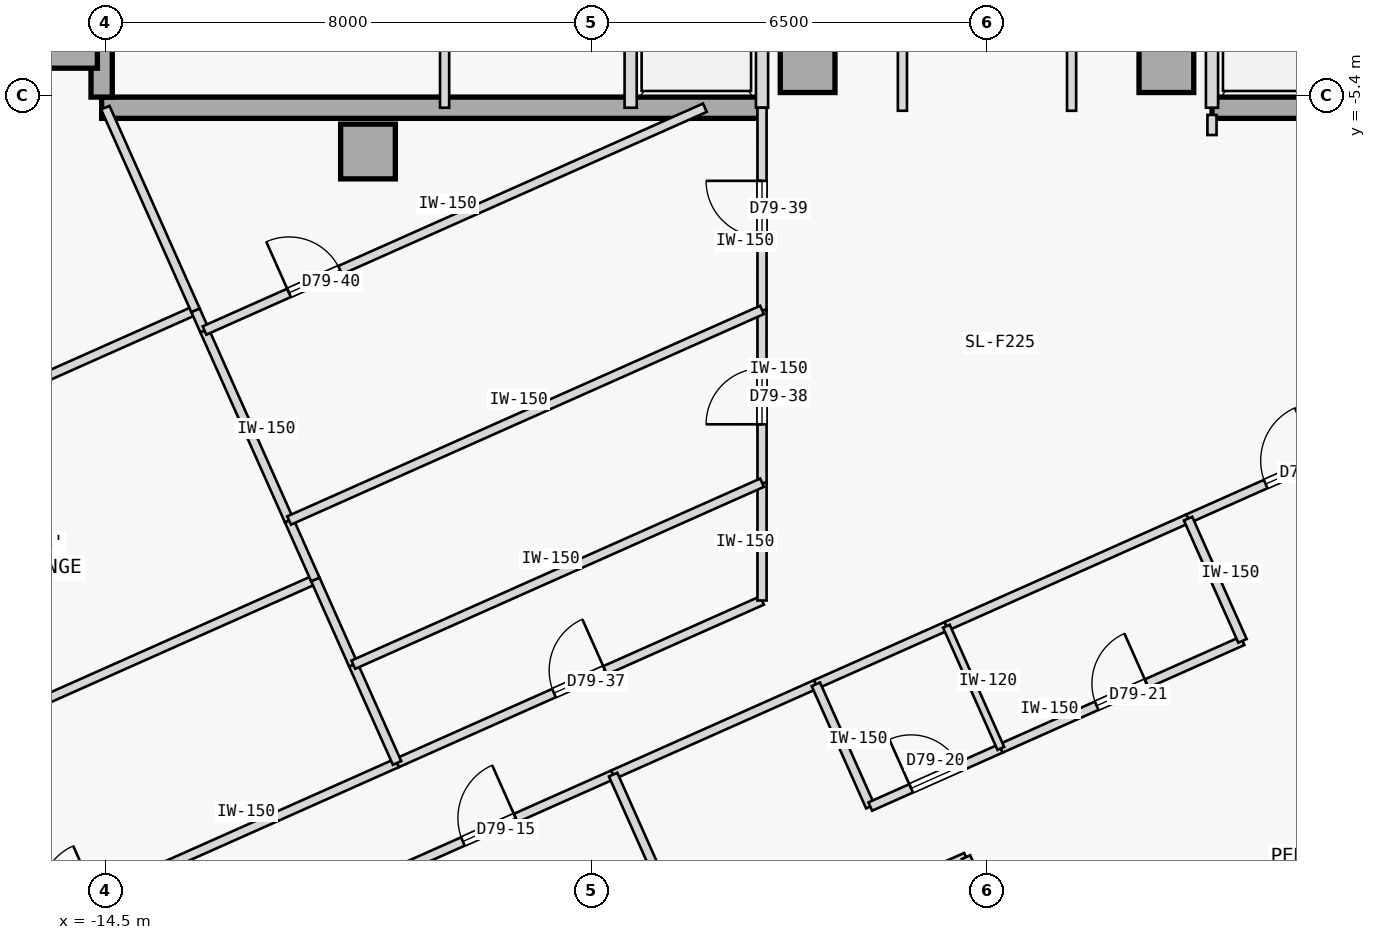
"""IFC4 building model, lengths in metres.
Left out: names, types, materials, properties, quantities, classifications, styles, units other than length and angle.
Written with IfcOpenShell. Run it as: python <this file> out.ifc"""

import sys

from ifc_helpers import new_model, si_unit, direction, frame, frame_2d, origin, origin_2d, place, context, subcontext, project, spatial, rectangle, extrude, element, fill, save


model = new_model("IFC4")
c1 = context("Model", 3, precision=1e-05, world=origin(), true_north=direction((0.0, 1.0)))
c2 = subcontext(c1, "Body", "Model", "MODEL_VIEW")
j1 = project(units=[si_unit("LENGTHUNIT", "METRE"), si_unit("PLANEANGLEUNIT", "RADIAN")], contexts=[c1])
p1 = place(None, origin())
s1 = spatial("IfcSite", under=j1, at=p1, CompositionType="ELEMENT")
p2 = place(p1, origin())
s2 = spatial("IfcBuilding", under=s1, at=p2, CompositionType="ELEMENT")
p3 = place(p2, frame((0.0, 0.0, 295.3)))
s3 = spatial("IfcBuildingStorey", under=s2, at=p3, CompositionType="ELEMENT", Elevation=295.3)
for number, where, z_axis, x_axis in (
    (1, (-15.08, -4.5, 0.0), (0.0, 0.0, 1.0), (1.0, 0.0, 0.0)),
    (2, (-10.18, -6.32, 0.0), (0.0, 0.0, 1.0), (1.0, 0.0, 0.0)),
    (3, (-2.95, -4.9, 0.0), (0.0, 0.0, 1.0), (1.0, 0.0, 0.0)),
    (4, (2.95, -4.9, 0.0), (0.0, 0.0, 1.0), (1.0, 0.0, 0.0)),
):
    element("IfcColumn", number, at=place(p3, frame(where, z_axis=z_axis, x_axis=x_axis)), inside=s3, PredefinedType="COLUMN", context=c2, shape_type="SweptSolid", body=[
        extrude(rectangle(XDim=0.9, YDim=0.9, at=origin_2d()), origin(), (0.0, 0.0, 1.0), 3.35),
    ])
p4 = place(p3, frame((-14.56, -5.6, 0.0), z_axis=(0.0, 0.0, 1.0), x_axis=(1.0, 0.0, 0.0)))
e5 = element("IfcWall", 5, at=p4, inside=s3, PredefinedType="SHEAR", context=c2, shape_type="SweptSolid", body=[
    extrude(rectangle(XDim=10.86, YDim=0.35, at=frame_2d((5.43, 0.0))), origin(), (0.0, 0.0, 1.0), 3.125),
])
p5 = place(p3, frame((-14.56, -5.425, 0.0), z_axis=(0.0, 0.0, 1.0), x_axis=(0.0, 1.0, 0.0)))
e6 = element("IfcWall", 6, at=p5, inside=s3, PredefinedType="SHEAR", context=c2, shape_type="SweptSolid", body=[
    extrude(rectangle(XDim=10.85, YDim=0.35, at=frame_2d((5.425, 0.0))), origin(), (0.0, 0.0, 1.0), 3.125),
])
p6 = place(p3, frame((3.7, -5.6, 0.0), z_axis=(0.0, 0.0, 1.0), x_axis=(1.0, 0.0, 0.0)))
e7 = element("IfcWall", 7, at=p6, inside=s3, PredefinedType="SHEAR", context=c2, shape_type="SweptSolid", body=[
    extrude(rectangle(XDim=10.86, YDim=0.35, at=frame_2d((5.43, 0.0))), origin(), (0.0, 0.0, 1.0), 3.125),
])
for number, where, z_axis, x_axis in (
    (8, (-3.7, -5.6, 0.0), (0.0, 0.0, 1.0), (0.0, 1.0, 0.0)),
    (9, (-5.86, -5.6, 0.0), (0.0, 0.0, 1.0), (0.0, 1.0, 0.0)),
    (10, (3.7, -5.6, 0.0), (0.0, 0.0, 1.0), (0.0, 1.0, 0.0)),
):
    element("IfcWall", number, at=place(p3, frame(where, z_axis=z_axis, x_axis=x_axis)), inside=s3, PredefinedType="STANDARD", context=c2, shape_type="SweptSolid", body=[
        extrude(rectangle(XDim=2.65, YDim=0.2, at=frame_2d((1.325, 0.0))), origin(), (0.0, 0.0, 1.0), 3.125),
    ])
p7 = place(p3, frame((-8.92, -5.6, 0.0), z_axis=(0.0, 0.0, 1.0), x_axis=(0.0, 1.0, 0.0)))
e11 = element("IfcWall", 11, at=p7, inside=s3, PredefinedType="PARTITIONING", context=c2, shape_type="SweptSolid", body=[
    extrude(rectangle(XDim=2.65, YDim=0.15, at=frame_2d((1.325, 0.0))), origin(), (0.0, 0.0, 1.0), 3.125),
])
p8 = place(p3, frame((-1.391, -5.65, 0.0), z_axis=(0.0, 0.0, 1.0), x_axis=(-2.1605738e-05, 0.999999999767, 0.0)))
e12 = element("IfcWall", 12, at=p8, inside=s3, PredefinedType="PARTITIONING", context=c2, shape_type="SweptSolid", body=[
    extrude(rectangle(XDim=11.3, YDim=0.15, at=frame_2d((5.65, 0.0))), origin(), (0.0, 0.0, 1.0), 3.125),
])
p9 = place(p3, frame((1.391, -5.65, 0.0), z_axis=(0.0, 0.0, 1.0), x_axis=(4.3206809e-05, 0.999999999067, 0.0)))
e13 = element("IfcWall", 13, at=p9, inside=s3, PredefinedType="PARTITIONING", context=c2, shape_type="SweptSolid", body=[
    extrude(rectangle(XDim=11.301, YDim=0.15, at=frame_2d((5.65, 0.0))), origin(), (0.0, 0.0, 1.0), 3.125),
])
p10 = place(p9, frame((5.176, 0.0, 0.0)))
e14 = element("IfcOpeningElement", 14, at=p10, cuts=e13, PredefinedType="OPENING", context=c2, shape_type="SweptSolid", body=[
    extrude(rectangle(XDim=0.95, YDim=2.15, at=frame_2d((0.475, 1.075))), frame((0.0, 0.085, 0.0), z_axis=(0.0, -1.0, 0.0), x_axis=(1.0, 0.0, 0.0)), (0.0, 0.0, 1.0), 0.17),
])
p11 = place(p3, frame((-10.221, -18.38, 0.0), z_axis=(0.0, 0.0, 1.0), x_axis=(0.913542602601, 0.406743055543, 0.0)))
e15 = element("IfcWall", 15, at=p11, inside=s3, PredefinedType="PARTITIONING", context=c2, shape_type="SweptSolid", body=[
    extrude(rectangle(XDim=4.458, YDim=0.15, at=frame_2d((2.229, 0.0))), origin(), (0.0, 0.0, 1.0), 3.125),
])
p12 = place(p11, frame((1.754, 0.0, 0.0)))
e16 = element("IfcOpeningElement", 16, at=p12, cuts=e15, PredefinedType="OPENING", context=c2, shape_type="SweptSolid", body=[
    extrude(rectangle(XDim=0.95, YDim=2.15, at=frame_2d((0.475, 1.075))), frame((0.0, 0.085, 0.0), z_axis=(0.0, -1.0, 0.0), x_axis=(1.0, 0.0, 0.0)), (0.0, 0.0, 1.0), 0.17),
])
p13 = place(p3, frame((-6.149, -16.567, 0.0), z_axis=(0.0, 0.0, 1.0), x_axis=(0.913543802, 0.40674036169, 0.0)))
e17 = element("IfcWall", 17, at=p13, inside=s3, PredefinedType="PARTITIONING", context=c2, shape_type="SweptSolid", body=[
    extrude(rectangle(XDim=3.65, YDim=0.15, at=frame_2d((1.825, 0.0))), origin(), (0.0, 0.0, 1.0), 3.125),
])
p14 = place(p3, frame((3.306, -12.357, 0.0), z_axis=(0.0, 0.0, 1.0), x_axis=(0.913550513402, 0.406725287464, 0.0)))
e18 = element("IfcWall", 18, at=p14, inside=s3, PredefinedType="PARTITIONING", context=c2, shape_type="SweptSolid", body=[
    extrude(rectangle(XDim=3.744, YDim=0.15, at=frame_2d((1.872, 0.0))), origin(), (0.0, 0.0, 1.0), 3.125),
])
p15 = place(p14, frame((1.397, 0.0, 0.0)))
e19 = element("IfcOpeningElement", 19, at=p15, cuts=e18, PredefinedType="OPENING", context=c2, shape_type="SweptSolid", body=[
    extrude(rectangle(XDim=0.95, YDim=2.15, at=frame_2d((0.475, 1.075))), frame((0.0, 0.085, 0.0), z_axis=(0.0, -1.0, 0.0), x_axis=(1.0, 0.0, 0.0)), (0.0, 0.0, 1.0), 0.17),
])
p16 = place(p3, frame((-2.814, -15.082, 0.0), z_axis=(0.0, 0.0, 1.0), x_axis=(0.913558622212, 0.406707073682, 0.0)))
e20 = element("IfcWall", 20, at=p16, inside=s3, PredefinedType="PARTITIONING", context=c2, shape_type="SweptSolid", body=[
    extrude(rectangle(XDim=2.35, YDim=0.15, at=frame_2d((1.175, 0.0))), origin(), (0.0, 0.0, 1.0), 3.125),
])
p17 = place(p3, frame((-0.667, -14.126, 0.0), z_axis=(0.0, 0.0, 1.0), x_axis=(0.913545193015, 0.406737237438, 0.0)))
e21 = element("IfcWall", 21, at=p17, inside=s3, PredefinedType="PARTITIONING", context=c2, shape_type="SweptSolid", body=[
    extrude(rectangle(XDim=4.35, YDim=0.15, at=frame_2d((2.175, 0.0))), origin(), (0.0, 0.0, 1.0), 3.125),
])
p18 = place(p3, frame((-20.445, -21.159, 0.0), z_axis=(0.0, 0.0, 1.0), x_axis=(0.913547681516, 0.406731648137, 0.0)))
e22 = element("IfcWall", 22, at=p18, inside=s3, PredefinedType="PARTITIONING", context=c2, shape_type="SweptSolid", body=[
    extrude(rectangle(XDim=11.76, YDim=0.15, at=frame_2d((5.88, 0.0))), origin(), (0.0, 0.0, 1.0), 3.125),
])
p19 = place(p18, frame((5.42, 0.0, 0.0)))
e23 = element("IfcOpeningElement", 23, at=p19, cuts=e22, PredefinedType="OPENING", context=c2, shape_type="SweptSolid", body=[
    extrude(rectangle(XDim=0.92, YDim=2.15, at=frame_2d((0.46, 1.075))), frame((0.0, 0.085, 0.0), z_axis=(0.0, -1.0, 0.0), x_axis=(1.0, 0.0, 0.0)), (0.0, 0.0, 1.0), 0.17),
])
p20 = place(p3, frame((3.699, -6.049, 0.0), z_axis=(0.0, 0.0, 1.0), x_axis=(0.001476013152, 0.999998910692, 0.0)))
e24 = element("IfcWall", 24, at=p20, inside=s3, PredefinedType="PARTITIONING", context=c2, shape_type="SweptSolid", body=[
    extrude(rectangle(XDim=0.331, YDim=0.15, at=frame_2d((0.166, 0.0))), origin(), (0.0, 0.0, 1.0), 3.125),
])
p21 = place(p3, frame((-9.702, -16.375, 0.0), z_axis=(0.0, 0.0, 1.0), x_axis=(0.913552389019, 0.406721074594, 0.0)))
e25 = element("IfcWall", 25, at=p21, inside=s3, PredefinedType="PARTITIONING", context=c2, shape_type="SweptSolid", body=[
    extrude(rectangle(XDim=6.57, YDim=0.15, at=frame_2d((3.285, 0.0))), origin(), (0.0, 0.0, 1.0), 3.125),
])
p22 = place(p21, frame((2.825, 0.0, 0.0)))
e26 = element("IfcOpeningElement", 26, at=p22, cuts=e25, PredefinedType="OPENING", context=c2, shape_type="SweptSolid", body=[
    extrude(rectangle(XDim=0.92, YDim=2.15, at=frame_2d((0.46, 1.075))), frame((0.0, 0.085, 0.0), z_axis=(0.0, -1.0, 0.0), x_axis=(1.0, 0.0, 0.0)), (0.0, 0.0, 1.0), 0.17),
])
p23 = place(p3, frame((-3.7, -13.703, 0.0), z_axis=(0.0, 0.0, 1.0), x_axis=(0.000126055716, 0.999999992055, 0.0)))
e27 = element("IfcWall", 27, at=p23, inside=s3, PredefinedType="PARTITIONING", context=c2, shape_type="SweptSolid", body=[
    extrude(rectangle(XDim=1.937, YDim=0.15, at=frame_2d((0.968, 0.0))), origin(), (0.0, 0.0, 1.0), 3.125),
])
p24 = place(p3, frame((-3.7, -11.767, 0.0), z_axis=(0.0, 0.0, 1.0), x_axis=(-0.000171850831, 0.999999985234, 0.0)))
e28 = element("IfcWall", 28, at=p24, inside=s3, PredefinedType="PARTITIONING", context=c2, shape_type="SweptSolid", body=[
    extrude(rectangle(XDim=2.841, YDim=0.15, at=frame_2d((1.421, 0.0))), origin(), (0.0, 0.0, 1.0), 3.125),
])
p25 = place(p24, frame((0.961, 0.0, 0.0)))
e29 = element("IfcOpeningElement", 29, at=p25, cuts=e28, PredefinedType="OPENING", context=c2, shape_type="SweptSolid", body=[
    extrude(rectangle(XDim=0.92, YDim=2.15, at=frame_2d((0.46, 1.075))), frame((0.0, 0.085, 0.0), z_axis=(0.0, -1.0, 0.0), x_axis=(1.0, 0.0, 0.0)), (0.0, 0.0, 1.0), 0.17),
])
p26 = place(p3, frame((-3.7, -8.925, 0.0), z_axis=(0.0, 0.0, 1.0), x_axis=(7.3410659e-05, 0.999999997305, 0.0)))
e30 = element("IfcWall", 30, at=p26, inside=s3, PredefinedType="PARTITIONING", context=c2, shape_type="SweptSolid", body=[
    extrude(rectangle(XDim=3.326, YDim=0.15, at=frame_2d((1.663, 0.0))), origin(), (0.0, 0.0, 1.0), 3.125),
])
p27 = place(p26, frame((1.203, 0.0, 0.0)))
e31 = element("IfcOpeningElement", 31, at=p27, cuts=e30, PredefinedType="OPENING", context=c2, shape_type="SweptSolid", body=[
    extrude(rectangle(XDim=0.92, YDim=2.15, at=frame_2d((0.46, 1.075))), frame((0.0, 0.085, 0.0), z_axis=(0.0, -1.0, 0.0), x_axis=(1.0, 0.0, 0.0)), (0.0, 0.0, 1.0), 0.17),
])
p28 = place(p3, frame((-2.271, -25.278, 0.0), z_axis=(0.0, 0.0, 1.0), x_axis=(-0.406751296215, 0.913538933504, 0.0)))
e32 = element("IfcWall", 32, at=p28, inside=s3, PredefinedType="PARTITIONING", context=c2, shape_type="SweptSolid", body=[
    extrude(rectangle(XDim=9.535, YDim=0.15, at=frame_2d((4.768, 0.0))), origin(), (0.0, 0.0, 1.0), 3.125),
])
p29 = place(p3, frame((-1.92, -17.092, 0.0), z_axis=(0.0, 0.0, 1.0), x_axis=(-0.406725294076, 0.913550510459, 0.0)))
e33 = element("IfcWall", 33, at=p29, inside=s3, PredefinedType="PARTITIONING", context=c2, shape_type="SweptSolid", body=[
    extrude(rectangle(XDim=2.2, YDim=0.15, at=frame_2d((1.1, 0.0))), origin(), (0.0, 0.0, 1.0), 3.125),
])
p30 = place(p3, frame((-1.92, -17.092, 0.0), z_axis=(0.0, 0.0, 1.0), x_axis=(0.913558622212, 0.406707073682, 0.0)))
e34 = element("IfcWall", 34, at=p30, inside=s3, PredefinedType="PARTITIONING", context=c2, shape_type="SweptSolid", body=[
    extrude(rectangle(XDim=2.35, YDim=0.15, at=frame_2d((1.175, 0.0))), origin(), (0.0, 0.0, 1.0), 3.125),
])
p31 = place(p30, frame((0.735, 0.0, 0.0)))
e35 = element("IfcOpeningElement", 35, at=p31, cuts=e34, PredefinedType="OPENING", context=c2, shape_type="SweptSolid", body=[
    extrude(rectangle(XDim=0.88, YDim=2.15, at=frame_2d((0.44, 1.075))), frame((0.0, 0.085, 0.0), z_axis=(0.0, -1.0, 0.0), x_axis=(1.0, 0.0, 0.0)), (0.0, 0.0, 1.0), 0.17),
])
p32 = place(p3, frame((0.227, -16.136, 0.0), z_axis=(0.0, 0.0, 1.0), x_axis=(0.913545193015, 0.406737237438, 0.0)))
e36 = element("IfcWall", 36, at=p32, inside=s3, PredefinedType="PARTITIONING", context=c2, shape_type="SweptSolid", body=[
    extrude(rectangle(XDim=4.35, YDim=0.15, at=frame_2d((2.175, 0.0))), origin(), (0.0, 0.0, 1.0), 3.125),
])
p33 = place(p32, frame((1.725, 0.0, 0.0)))
e37 = element("IfcOpeningElement", 37, at=p33, cuts=e36, PredefinedType="OPENING", context=c2, shape_type="SweptSolid", body=[
    extrude(rectangle(XDim=0.9, YDim=2.15, at=frame_2d((0.45, 1.075))), frame((0.0, 0.085, 0.0), z_axis=(0.0, -1.0, 0.0), x_axis=(1.0, 0.0, 0.0)), (0.0, 0.0, 1.0), 0.17),
])
p34 = place(p3, frame((4.201, -14.367, 0.0), z_axis=(0.0, 0.0, 1.0), x_axis=(-0.406725294076, 0.913550510459, 0.0)))
e38 = element("IfcWall", 38, at=p34, inside=s3, PredefinedType="PARTITIONING", context=c2, shape_type="SweptSolid", body=[
    extrude(rectangle(XDim=2.2, YDim=0.15, at=frame_2d((1.1, 0.0))), origin(), (0.0, 0.0, 1.0), 3.125),
])
p35 = place(p3, frame((-4.593, -19.815, 0.0), z_axis=(0.0, 0.0, 1.0), x_axis=(0.91354505039, 0.40673755778, 0.0)))
e39 = element("IfcWall", 39, at=p35, inside=s3, PredefinedType="PARTITIONING", context=c2, shape_type="SweptSolid", body=[
    extrude(rectangle(XDim=4.65, YDim=0.15, at=frame_2d((2.325, 0.0))), origin(), (0.0, 0.0, 1.0), 3.125),
])
p36 = place(p3, frame((2.069, -23.346, 0.0), z_axis=(0.0, 0.0, 1.0), x_axis=(-0.406699433793, 0.913562023375, 0.0)))
e40 = element("IfcWall", 40, at=p36, inside=s3, PredefinedType="PARTITIONING", context=c2, shape_type="SweptSolid", body=[
    extrude(rectangle(XDim=5.935, YDim=0.15, at=frame_2d((2.968, 0.0))), origin(), (0.0, 0.0, 1.0), 3.125),
])
p37 = place(p36, frame((2.518, 0.0, 0.0)))
e41 = element("IfcOpeningElement", 41, at=p37, cuts=e40, PredefinedType="OPENING", context=c2, shape_type="SweptSolid", body=[
    extrude(rectangle(XDim=0.9, YDim=2.15, at=frame_2d((0.45, 1.075))), frame((0.0, 0.085, 0.0), z_axis=(0.0, -1.0, 0.0), x_axis=(1.0, 0.0, 0.0)), (0.0, 0.0, 1.0), 0.17),
])
p38 = place(p3, frame((0.227, -16.136, 0.0), z_axis=(0.0, 0.0, 1.0), x_axis=(-0.406725294076, 0.913550510459, 0.0)))
e42 = element("IfcWall", 42, at=p38, inside=s3, PredefinedType="PARTITIONING", context=c2, shape_type="SweptSolid", body=[
    extrude(rectangle(XDim=2.2, YDim=0.12, at=frame_2d((1.1, 0.0))), origin(), (0.0, 0.0, 1.0), 3.125),
])
p39 = place(p3, frame((-21.789, -18.14, 0.0), z_axis=(0.0, 0.0, 1.0), x_axis=(0.913544247064, 0.406739362069, 0.0)))
e43 = element("IfcWall", 43, at=p39, inside=s3, PredefinedType="PARTITIONING", context=c2, shape_type="SweptSolid", body=[
    extrude(rectangle(XDim=11.76, YDim=0.15, at=frame_2d((5.88, 0.0))), origin(), (0.0, 0.0, 1.0), 3.125),
])
p40 = place(p3, frame((-9.702, -16.375, 0.0), z_axis=(0.0, 0.0, 1.0), x_axis=(-0.406740252054, 0.913543850813, 0.0)))
e44 = element("IfcWall", 44, at=p40, inside=s3, PredefinedType="PARTITIONING", context=c2, shape_type="SweptSolid", body=[
    extrude(rectangle(XDim=1.769, YDim=0.15, at=frame_2d((0.884, 0.0))), origin(), (0.0, 0.0, 1.0), 3.125),
])
p41 = place(p3, frame((-10.421, -14.76, 0.0), z_axis=(0.0, 0.0, 1.0), x_axis=(-0.406817131294, 0.91350961773, 0.0)))
e45 = element("IfcWall", 45, at=p41, inside=s3, PredefinedType="PARTITIONING", context=c2, shape_type="SweptSolid", body=[
    extrude(rectangle(XDim=1.535, YDim=0.15, at=frame_2d((0.768, 0.0))), origin(), (0.0, 0.0, 1.0), 3.125),
])
p42 = place(p3, frame((-21.942, -12.904, 0.0), z_axis=(0.0, 0.0, 1.0), x_axis=(0.913542396088, 0.40674351937, 0.0)))
e46 = element("IfcWall", 46, at=p42, inside=s3, PredefinedType="PARTITIONING", context=c2, shape_type="SweptSolid", body=[
    extrude(rectangle(XDim=9.77, YDim=0.15, at=frame_2d((4.885, 0.0))), origin(), (0.0, 0.0, 1.0), 3.125),
])
p43 = place(p3, frame((-11.046, -13.357, 0.0), z_axis=(0.0, 0.0, 1.0), x_axis=(-0.406629497236, 0.913593154515, 0.0)))
e47 = element("IfcWall", 47, at=p43, inside=s3, PredefinedType="PARTITIONING", context=c2, shape_type="SweptSolid", body=[
    extrude(rectangle(XDim=1.061, YDim=0.15, at=frame_2d((0.53, 0.0))), origin(), (0.0, 0.0, 1.0), 3.125),
])
p44 = place(p3, frame((-11.477, -12.388, 0.0), z_axis=(0.0, 0.0, 1.0), x_axis=(-0.406760980894, 0.913534621359, 0.0)))
e48 = element("IfcWall", 48, at=p44, inside=s3, PredefinedType="PARTITIONING", context=c2, shape_type="SweptSolid", body=[
    extrude(rectangle(XDim=3.42, YDim=0.15, at=frame_2d((1.71, 0.0))), origin(), (0.0, 0.0, 1.0), 3.125),
])
p45 = place(p3, frame((-12.868, -9.264, 0.0), z_axis=(0.0, 0.0, 1.0), x_axis=(-0.406634840409, 0.913590776314, 0.0)))
e49 = element("IfcWall", 49, at=p45, inside=s3, PredefinedType="PARTITIONING", context=c2, shape_type="SweptSolid", body=[
    extrude(rectangle(XDim=0.365, YDim=0.15, at=frame_2d((0.183, 0.0))), origin(), (0.0, 0.0, 1.0), 3.125),
])
p46 = place(p3, frame((-13.017, -8.93, 0.0), z_axis=(0.0, 0.0, 1.0), x_axis=(-0.406722395322, 0.913551801018, 0.0)))
e50 = element("IfcWall", 50, at=p46, inside=s3, PredefinedType="PARTITIONING", context=c2, shape_type="SweptSolid", body=[
    extrude(rectangle(XDim=3.646, YDim=0.15, at=frame_2d((1.823, 0.0))), origin(), (0.0, 0.0, 1.0), 3.125),
])
p47 = place(p3, frame((-10.421, -14.76, 0.0), z_axis=(0.0, 0.0, 1.0), x_axis=(0.913533574053, 0.406763333006, 0.0)))
e51 = element("IfcWall", 51, at=p47, inside=s3, PredefinedType="PARTITIONING", context=c2, shape_type="SweptSolid", body=[
    extrude(rectangle(XDim=7.358, YDim=0.15, at=frame_2d((3.679, 0.0))), origin(), (0.0, 0.0, 1.0), 3.125),
])
p48 = place(p3, frame((-11.477, -12.388, 0.0), z_axis=(0.0, 0.0, 1.0), x_axis=(0.913542897736, 0.406742392673, 0.0)))
e52 = element("IfcWall", 52, at=p48, inside=s3, PredefinedType="PARTITIONING", context=c2, shape_type="SweptSolid", body=[
    extrude(rectangle(XDim=8.513, YDim=0.15, at=frame_2d((4.257, 0.0))), origin(), (0.0, 0.0, 1.0), 3.125),
])
p49 = place(p3, frame((-12.868, -9.264, 0.0), z_axis=(0.0, 0.0, 1.0), x_axis=(0.913545332854, 0.406736923356, 0.0)))
e53 = element("IfcWall", 53, at=p49, inside=s3, PredefinedType="PARTITIONING", context=c2, shape_type="SweptSolid", body=[
    extrude(rectangle(XDim=9.007, YDim=0.15, at=frame_2d((4.504, 0.0))), origin(), (0.0, 0.0, 1.0), 3.125),
])
p50 = place(p49, frame((1.521, 0.0, 0.0)))
e54 = element("IfcOpeningElement", 54, at=p50, cuts=e53, PredefinedType="OPENING", context=c2, shape_type="SweptSolid", body=[
    extrude(rectangle(XDim=0.92, YDim=2.15, at=frame_2d((0.46, 1.075))), frame((0.0, 0.085, 0.0), z_axis=(0.0, -1.0, 0.0), x_axis=(1.0, 0.0, 0.0)), (0.0, 0.0, 1.0), 0.17),
])
p51 = place(p12, origin())
e55 = element("IfcDoor", 55, at=p51, inside=s3, OperationType="SINGLE_SWING_RIGHT", PredefinedType="DOOR", context=c2, shape_type="SweptSolid", body=[
    extrude(rectangle(XDim=0.95, YDim=2.15, at=frame_2d((0.475, 1.075))), frame((0.0, 0.025, 0.0), z_axis=(0.0, -1.0, 0.0), x_axis=(1.0, 0.0, 0.0)), (0.0, 0.0, 1.0), 0.05),
])
fill(e16, e55)
p52 = place(p15, origin())
e56 = element("IfcDoor", 56, at=p52, inside=s3, OperationType="SINGLE_SWING_RIGHT", PredefinedType="DOOR", context=c2, shape_type="SweptSolid", body=[
    extrude(rectangle(XDim=0.95, YDim=2.15, at=frame_2d((0.475, 1.075))), frame((0.0, 0.025, 0.0), z_axis=(0.0, -1.0, 0.0), x_axis=(1.0, 0.0, 0.0)), (0.0, 0.0, 1.0), 0.05),
])
fill(e19, e56)
p53 = place(p31, origin())
e57 = element("IfcDoor", 57, at=p53, inside=s3, OperationType="SINGLE_SWING_LEFT", PredefinedType="DOOR", context=c2, shape_type="SweptSolid", body=[
    extrude(rectangle(XDim=0.88, YDim=2.15, at=frame_2d((0.44, 1.075))), frame((0.0, 0.025, 0.0), z_axis=(0.0, -1.0, 0.0), x_axis=(1.0, 0.0, 0.0)), (0.0, 0.0, 1.0), 0.05),
])
fill(e35, e57)
p54 = place(p33, origin())
e58 = element("IfcDoor", 58, at=p54, inside=s3, OperationType="SINGLE_SWING_RIGHT", PredefinedType="DOOR", context=c2, shape_type="SweptSolid", body=[
    extrude(rectangle(XDim=0.9, YDim=2.15, at=frame_2d((0.45, 1.075))), frame((0.0, 0.025, 0.0), z_axis=(0.0, -1.0, 0.0), x_axis=(1.0, 0.0, 0.0)), (0.0, 0.0, 1.0), 0.05),
])
fill(e37, e58)
p55 = place(p22, origin())
e59 = element("IfcDoor", 59, at=p55, inside=s3, OperationType="SINGLE_SWING_RIGHT", PredefinedType="DOOR", context=c2, shape_type="SweptSolid", body=[
    extrude(rectangle(XDim=0.92, YDim=2.15, at=frame_2d((0.46, 1.075))), frame((0.0, 0.025, 0.0), z_axis=(0.0, -1.0, 0.0), x_axis=(1.0, 0.0, 0.0)), (0.0, 0.0, 1.0), 0.05),
])
fill(e26, e59)
p56 = place(p25, origin())
e60 = element("IfcDoor", 60, at=p56, inside=s3, OperationType="SINGLE_SWING_LEFT", PredefinedType="DOOR", context=c2, shape_type="SweptSolid", body=[
    extrude(rectangle(XDim=0.92, YDim=2.15, at=frame_2d((0.46, 1.075))), frame((0.0, 0.025, 0.0), z_axis=(0.0, -1.0, 0.0), x_axis=(1.0, 0.0, 0.0)), (0.0, 0.0, 1.0), 0.05),
])
fill(e29, e60)
p57 = place(p27, origin())
e61 = element("IfcDoor", 61, at=p57, inside=s3, OperationType="SINGLE_SWING_RIGHT", PredefinedType="DOOR", context=c2, shape_type="SweptSolid", body=[
    extrude(rectangle(XDim=0.92, YDim=2.15, at=frame_2d((0.46, 1.075))), frame((0.0, 0.025, 0.0), z_axis=(0.0, -1.0, 0.0), x_axis=(1.0, 0.0, 0.0)), (0.0, 0.0, 1.0), 0.05),
])
fill(e31, e61)
p58 = place(p50, origin())
e62 = element("IfcDoor", 62, at=p58, inside=s3, OperationType="SINGLE_SWING_LEFT", PredefinedType="DOOR", context=c2, shape_type="SweptSolid", body=[
    extrude(rectangle(XDim=0.92, YDim=2.15, at=frame_2d((0.46, 1.075))), frame((0.0, 0.025, 0.0), z_axis=(0.0, -1.0, 0.0), x_axis=(1.0, 0.0, 0.0)), (0.0, 0.0, 1.0), 0.05),
])
fill(e54, e62)
save(model, sys.argv[1])
